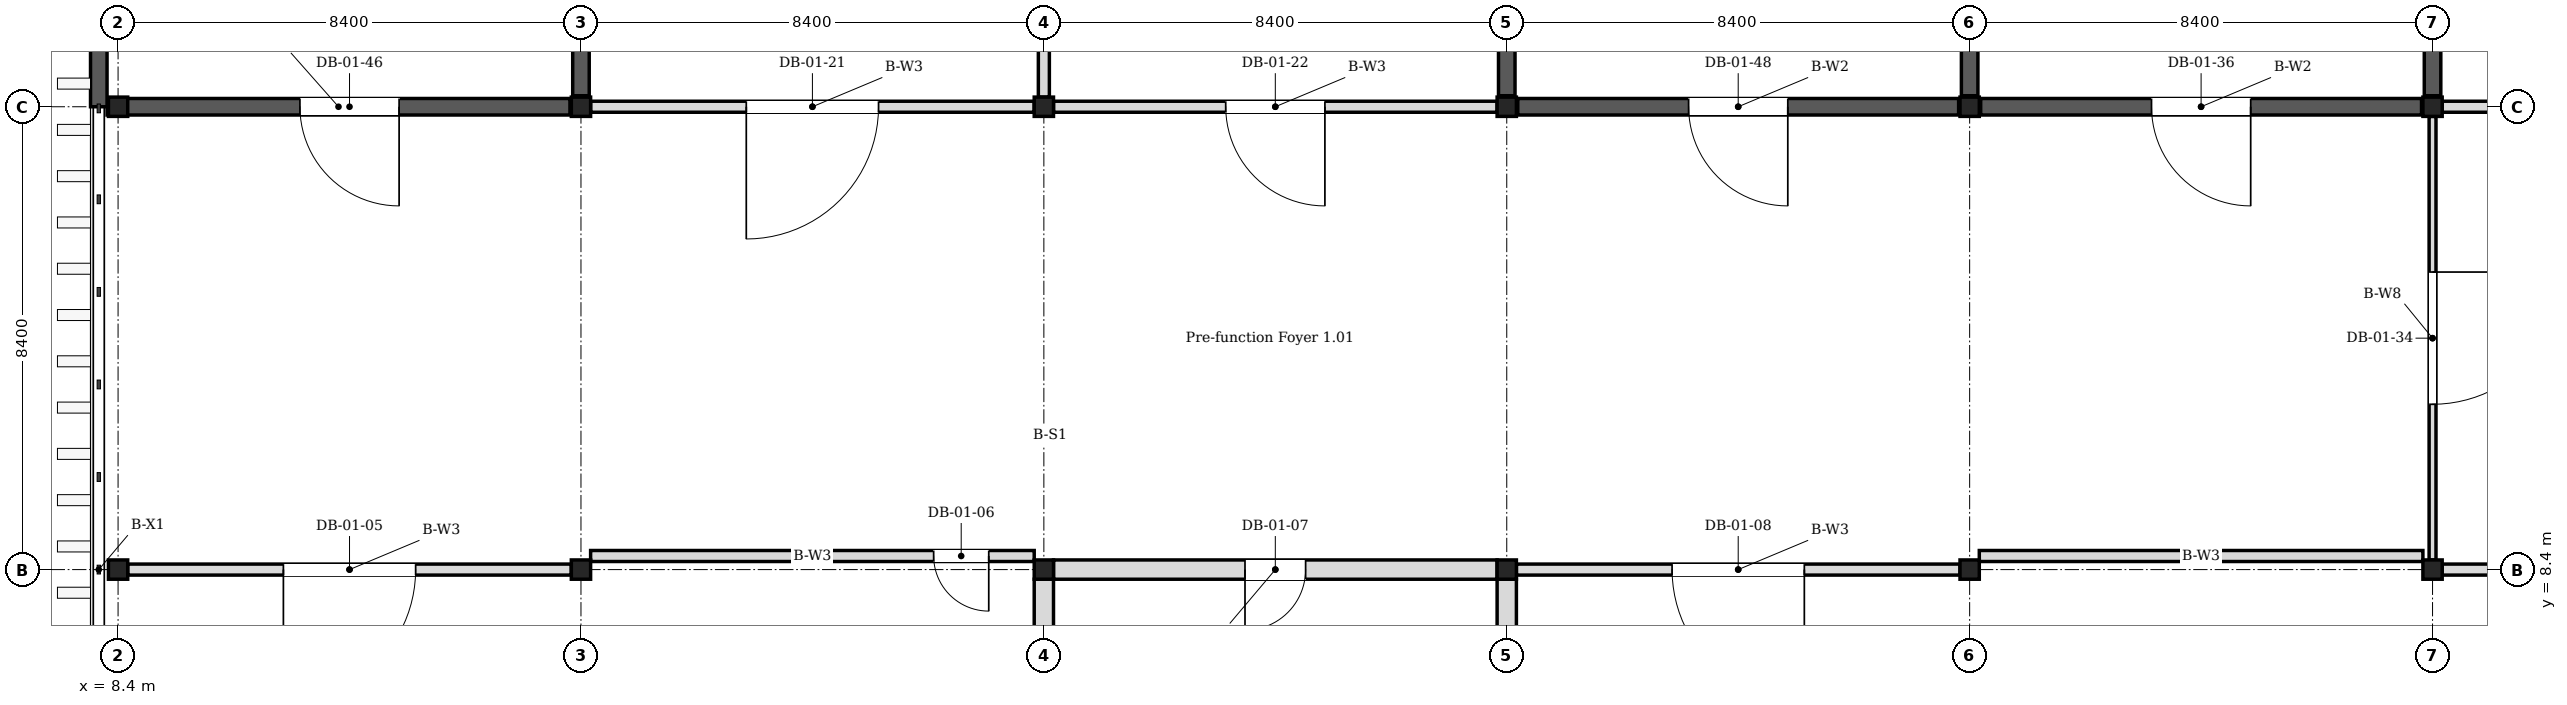
"""IFC4 building model, lengths in metres.
Left out: names, types, materials, properties, quantities, classifications, styles, units other than length and angle.
Written with IfcOpenShell. Run it as: python <this file> out.ifc"""

import sys

from ifc_helpers import new_model, si_unit, direction, frame, frame_2d, origin, origin_2d, place, context, subcontext, project, spatial, rectangle, i_section, extrude, element, fill, save


model = new_model("IFC4")
c1 = context("Model", 3, precision=1e-05, world=origin(), true_north=direction((0.0, 1.0)))
c2 = subcontext(c1, "Body", "Model", "MODEL_VIEW")
j1 = project(units=[si_unit("LENGTHUNIT", "METRE"), si_unit("PLANEANGLEUNIT", "RADIAN")], contexts=[c1])
p1 = place(None, origin())
s1 = spatial("IfcSite", under=j1, at=p1, CompositionType="ELEMENT")
p2 = place(p1, origin())
s2 = spatial("IfcBuilding", under=s1, at=p2, CompositionType="ELEMENT")
p3 = place(p2, frame((0.0, 0.0, 6.0)))
s3 = spatial("IfcBuildingStorey", under=s2, at=p3, CompositionType="ELEMENT", Elevation=6.0)
for number, where, z_axis, x_axis in (
    (1, (8.4, 8.4, 0.0), (0.0, 0.0, 1.0), (1.0, 0.0, 0.0)),
    (2, (8.4, 16.8, 0.0), (0.0, 0.0, 1.0), (1.0, 0.0, 0.0)),
    (3, (16.8, 8.4, 0.0), (0.0, 0.0, 1.0), (1.0, 0.0, 0.0)),
    (4, (16.8, 16.8, 0.0), (0.0, 0.0, 1.0), (1.0, 0.0, 0.0)),
    (5, (25.2, 8.4, 0.0), (0.0, 0.0, 1.0), (1.0, 0.0, 0.0)),
    (6, (25.2, 16.8, 0.0), (0.0, 0.0, 1.0), (1.0, 0.0, 0.0)),
    (7, (33.6, 8.4, 0.0), (0.0, 0.0, 1.0), (1.0, 0.0, 0.0)),
    (8, (33.6, 16.8, 0.0), (0.0, 0.0, 1.0), (1.0, 0.0, 0.0)),
    (9, (42.0, 8.4, 0.0), (0.0, 0.0, 1.0), (1.0, 0.0, 0.0)),
    (10, (42.0, 16.8, 0.0), (0.0, 0.0, 1.0), (1.0, 0.0, 0.0)),
    (11, (50.4, 8.4, 0.0), (0.0, 0.0, 1.0), (1.0, 0.0, 0.0)),
    (12, (50.4, 16.8, 0.0), (0.0, 0.0, 1.0), (1.0, 0.0, 0.0)),
):
    element("IfcColumn", number, at=place(p3, frame(where, z_axis=z_axis, x_axis=x_axis)), inside=s3, PredefinedType="COLUMN", context=c2, shape_type="SweptSolid", body=[
        extrude(i_section(OverallWidth=0.35, OverallDepth=0.35, WebThickness=0.012, FlangeThickness=0.019, FilletRadius=0.013, at=origin_2d()), origin(), (0.0, 0.0, 1.0), 4.2),
    ])
for number, where, z_axis, x_axis in (
    (13, (42.0, 17.0, 0.0), (0.0, 0.0, 1.0), (0.0, 1.0, 0.0)),
    (14, (50.4, 17.0, 0.0), (0.0, 0.0, 1.0), (0.0, 1.0, 0.0)),
):
    element("IfcWall", number, at=place(p3, frame(where, z_axis=z_axis, x_axis=x_axis)), inside=s3, PredefinedType="SHEAR", context=c2, shape_type="SweptSolid", body=[
        extrude(rectangle(XDim=8.0, YDim=0.3, at=frame_2d((4.0, 0.0))), origin(), (0.0, 0.0, 1.0), 4.05),
    ])
p4 = place(p3, frame((42.2, 16.8, 0.0), z_axis=(0.0, 0.0, 1.0), x_axis=(1.0, 0.0, 0.0)))
e15 = element("IfcWall", 15, at=p4, inside=s3, PredefinedType="SHEAR", context=c2, shape_type="SweptSolid", body=[
    extrude(rectangle(XDim=8.0, YDim=0.3, at=frame_2d((4.0, 0.0))), origin(), (0.0, 0.0, 1.0), 4.05),
])
p5 = place(p4, frame((3.1, 0.0, 0.0)))
e16 = element("IfcOpeningElement", 16, at=p5, cuts=e15, PredefinedType="OPENING", context=c2, shape_type="SweptSolid", body=[
    extrude(rectangle(XDim=1.8, YDim=2.1, at=frame_2d((0.9, 1.05))), frame((0.0, 0.16, 0.0), z_axis=(0.0, -1.0, 0.0), x_axis=(1.0, 0.0, 0.0)), (0.0, 0.0, 1.0), 0.32),
])
p6 = place(p3, frame((8.05, 16.8, 0.0), z_axis=(0.0, 0.0, 1.0), x_axis=(0.0, 1.0, 0.0)))
e17 = element("IfcWall", 17, at=p6, inside=s3, PredefinedType="SHEAR", context=c2, shape_type="SweptSolid", body=[
    extrude(rectangle(XDim=8.6, YDim=0.3, at=frame_2d((4.3, 0.0))), origin(), (0.0, 0.0, 1.0), 4.05),
])
p7 = place(p3, frame((16.8, 17.0, 0.0), z_axis=(0.0, 0.0, 1.0), x_axis=(0.0, 1.0, 0.0)))
e18 = element("IfcWall", 18, at=p7, inside=s3, PredefinedType="SHEAR", context=c2, shape_type="SweptSolid", body=[
    extrude(rectangle(XDim=8.0, YDim=0.3, at=frame_2d((4.0, 0.0))), origin(), (0.0, 0.0, 1.0), 4.05),
])
p8 = place(p3, frame((8.2, 16.8, 0.0), z_axis=(0.0, 0.0, 1.0), x_axis=(1.0, 0.0, 0.0)))
e19 = element("IfcWall", 19, at=p8, inside=s3, PredefinedType="SHEAR", context=c2, shape_type="SweptSolid", body=[
    extrude(rectangle(XDim=8.4, YDim=0.3, at=frame_2d((4.2, 0.0))), origin(), (0.0, 0.0, 1.0), 4.05),
])
p9 = place(p8, frame((3.5, 0.0, 0.0)))
e20 = element("IfcOpeningElement", 20, at=p9, cuts=e19, PredefinedType="OPENING", context=c2, shape_type="SweptSolid", body=[
    extrude(rectangle(XDim=1.8, YDim=2.1, at=frame_2d((0.9, 1.05))), frame((0.0, 0.16, 0.0), z_axis=(0.0, -1.0, 0.0), x_axis=(1.0, 0.0, 0.0)), (0.0, 0.0, 1.0), 0.32),
])
p10 = place(p3, frame((33.6, 17.0, 0.0), z_axis=(0.0, 0.0, 1.0), x_axis=(0.0, 1.0, 0.0)))
e21 = element("IfcWall", 21, at=p10, inside=s3, PredefinedType="SHEAR", context=c2, shape_type="SweptSolid", body=[
    extrude(rectangle(XDim=8.0, YDim=0.3, at=frame_2d((4.0, 0.0))), origin(), (0.0, 0.0, 1.0), 4.05),
])
p11 = place(p3, frame((33.8, 16.8, 0.0), z_axis=(0.0, 0.0, 1.0), x_axis=(1.0, 0.0, 0.0)))
e22 = element("IfcWall", 22, at=p11, inside=s3, PredefinedType="SHEAR", context=c2, shape_type="SweptSolid", body=[
    extrude(rectangle(XDim=8.0, YDim=0.3, at=frame_2d((4.0, 0.0))), origin(), (0.0, 0.0, 1.0), 4.05),
])
p12 = place(p11, frame((3.1, 0.0, 0.0)))
e23 = element("IfcOpeningElement", 23, at=p12, cuts=e22, PredefinedType="OPENING", context=c2, shape_type="SweptSolid", body=[
    extrude(rectangle(XDim=1.8, YDim=2.1, at=frame_2d((0.9, 1.05))), frame((0.0, 0.16, 0.0), z_axis=(0.0, -1.0, 0.0), x_axis=(1.0, 0.0, 0.0)), (0.0, 0.0, 1.0), 0.32),
])
p13 = place(p3, frame((8.575, 8.4, 0.0), z_axis=(0.0, 0.0, 1.0), x_axis=(1.0, 0.0, 0.0)))
e24 = element("IfcWall", 24, at=p13, inside=s3, PredefinedType="PARTITIONING", context=c2, shape_type="SweptSolid", body=[
    extrude(rectangle(XDim=8.05, YDim=0.2, at=frame_2d((4.025, 0.0))), origin(), (0.0, 0.0, 1.0), 3.35),
])
p14 = place(p13, frame((2.825, 0.0, 0.0)))
e25 = element("IfcOpeningElement", 25, at=p14, cuts=e24, PredefinedType="OPENING", context=c2, shape_type="SweptSolid", body=[
    extrude(rectangle(XDim=2.4, YDim=2.2, at=frame_2d((1.2, 1.1))), frame((0.0, 0.11, 0.0), z_axis=(0.0, -1.0, 0.0), x_axis=(1.0, 0.0, 0.0)), (0.0, 0.0, 1.0), 0.22),
])
p15 = place(p3, frame((16.975, 8.646, 0.0), z_axis=(0.0, 0.0, 1.0), x_axis=(1.0, 0.0, 0.0)))
e26 = element("IfcWall", 26, at=p15, inside=s3, PredefinedType="PARTITIONING", context=c2, shape_type="SweptSolid", body=[
    extrude(rectangle(XDim=8.05, YDim=0.2, at=frame_2d((4.025, 0.0))), origin(), (0.0, 0.0, 1.0), 3.35),
])
p16 = place(p15, frame((6.225, 0.0, 0.0)))
e27 = element("IfcOpeningElement", 27, at=p16, cuts=e26, PredefinedType="OPENING", context=c2, shape_type="SweptSolid", body=[
    extrude(rectangle(XDim=1.0, YDim=2.1, at=frame_2d((0.5, 1.05))), frame((0.0, 0.11, 0.0), z_axis=(0.0, -1.0, 0.0), x_axis=(1.0, 0.0, 0.0)), (0.0, 0.0, 1.0), 0.22),
])
p17 = place(p3, frame((25.375, 8.4, 0.0), z_axis=(0.0, 0.0, 1.0), x_axis=(1.0, 0.0, 0.0)))
e28 = element("IfcWall", 28, at=p17, inside=s3, PredefinedType="PARTITIONING", context=c2, shape_type="SweptSolid", body=[
    extrude(rectangle(XDim=8.05, YDim=0.35, at=frame_2d((4.025, 0.0))), origin(), (0.0, 0.0, 1.0), 3.35),
])
p18 = place(p17, frame((3.475, 0.0, 0.0)))
e29 = element("IfcOpeningElement", 29, at=p18, cuts=e28, PredefinedType="OPENING", context=c2, shape_type="SweptSolid", body=[
    extrude(rectangle(XDim=1.1, YDim=2.4, at=frame_2d((0.55, 1.2))), frame((0.0, 0.185, 0.0), z_axis=(0.0, -1.0, 0.0), x_axis=(1.0, 0.0, 0.0)), (0.0, 0.0, 1.0), 0.37),
])
p19 = place(p3, frame((33.775, 8.4, 0.0), z_axis=(0.0, 0.0, 1.0), x_axis=(1.0, 0.0, 0.0)))
e30 = element("IfcWall", 30, at=p19, inside=s3, PredefinedType="PARTITIONING", context=c2, shape_type="SweptSolid", body=[
    extrude(rectangle(XDim=8.05, YDim=0.2, at=frame_2d((4.025, 0.0))), origin(), (0.0, 0.0, 1.0), 3.35),
])
p20 = place(p19, frame((2.825, 0.0, 0.0)))
e31 = element("IfcOpeningElement", 31, at=p20, cuts=e30, PredefinedType="OPENING", context=c2, shape_type="SweptSolid", body=[
    extrude(rectangle(XDim=2.4, YDim=2.2, at=frame_2d((1.2, 1.1))), frame((0.0, 0.11, 0.0), z_axis=(0.0, -1.0, 0.0), x_axis=(1.0, 0.0, 0.0)), (0.0, 0.0, 1.0), 0.22),
])
p21 = place(p3, frame((42.175, 8.646, 0.0), z_axis=(0.0, 0.0, 1.0), x_axis=(1.0, 0.0, 0.0)))
e32 = element("IfcWall", 32, at=p21, inside=s3, PredefinedType="PARTITIONING", context=c2, shape_type="SweptSolid", body=[
    extrude(rectangle(XDim=8.05, YDim=0.2, at=frame_2d((4.025, 0.0))), origin(), (0.0, 0.0, 1.0), 3.35),
])
p22 = place(p3, frame((50.575, 8.4, 0.0), z_axis=(0.0, 0.0, 1.0), x_axis=(1.0, 0.0, 0.0)))
e33 = element("IfcWall", 33, at=p22, inside=s3, PredefinedType="PARTITIONING", context=c2, shape_type="SweptSolid", body=[
    extrude(rectangle(XDim=8.05, YDim=0.2, at=frame_2d((4.025, 0.0))), origin(), (0.0, 0.0, 1.0), 3.35),
])
p23 = place(p22, frame((2.825, 0.0, 0.0)))
e34 = element("IfcOpeningElement", 34, at=p23, cuts=e33, PredefinedType="OPENING", context=c2, shape_type="SweptSolid", body=[
    extrude(rectangle(XDim=2.4, YDim=2.2, at=frame_2d((1.2, 1.1))), frame((0.0, 0.11, 0.0), z_axis=(0.0, -1.0, 0.0), x_axis=(1.0, 0.0, 0.0)), (0.0, 0.0, 1.0), 0.22),
])
p24 = place(p3, frame((16.975, 16.8, 0.0), z_axis=(0.0, 0.0, 1.0), x_axis=(1.0, 0.0, 0.0)))
e35 = element("IfcWall", 35, at=p24, inside=s3, PredefinedType="PARTITIONING", context=c2, shape_type="SweptSolid", body=[
    extrude(rectangle(XDim=8.05, YDim=0.2, at=frame_2d((4.025, 0.0))), origin(), (0.0, 0.0, 1.0), 3.35),
])
p25 = place(p24, frame((2.825, 0.0, 0.0)))
e36 = element("IfcOpeningElement", 36, at=p25, cuts=e35, PredefinedType="OPENING", context=c2, shape_type="SweptSolid", body=[
    extrude(rectangle(XDim=2.4, YDim=2.2, at=frame_2d((1.2, 1.1))), frame((0.0, 0.11, 0.0), z_axis=(0.0, -1.0, 0.0), x_axis=(1.0, 0.0, 0.0)), (0.0, 0.0, 1.0), 0.22),
])
p26 = place(p3, frame((25.375, 16.8, 0.0), z_axis=(0.0, 0.0, 1.0), x_axis=(1.0, 0.0, 0.0)))
e37 = element("IfcWall", 37, at=p26, inside=s3, PredefinedType="PARTITIONING", context=c2, shape_type="SweptSolid", body=[
    extrude(rectangle(XDim=8.05, YDim=0.2, at=frame_2d((4.025, 0.0))), origin(), (0.0, 0.0, 1.0), 3.35),
])
p27 = place(p26, frame((3.125, 0.0, 0.0)))
e38 = element("IfcOpeningElement", 38, at=p27, cuts=e37, PredefinedType="OPENING", context=c2, shape_type="SweptSolid", body=[
    extrude(rectangle(XDim=1.8, YDim=2.1, at=frame_2d((0.9, 1.05))), frame((0.0, 0.11, 0.0), z_axis=(0.0, -1.0, 0.0), x_axis=(1.0, 0.0, 0.0)), (0.0, 0.0, 1.0), 0.22),
])
p28 = place(p3, frame((50.575, 16.8, 0.0), z_axis=(0.0, 0.0, 1.0), x_axis=(1.0, 0.0, 0.0)))
e39 = element("IfcWall", 39, at=p28, inside=s3, PredefinedType="PARTITIONING", context=c2, shape_type="SweptSolid", body=[
    extrude(rectangle(XDim=8.05, YDim=0.2, at=frame_2d((4.025, 0.0))), origin(), (0.0, 0.0, 1.0), 3.35),
])
p29 = place(p28, frame((3.125, 0.0, 0.0)))
e40 = element("IfcOpeningElement", 40, at=p29, cuts=e39, PredefinedType="OPENING", context=c2, shape_type="SweptSolid", body=[
    extrude(rectangle(XDim=1.8, YDim=2.1, at=frame_2d((0.9, 1.05))), frame((0.0, 0.11, 0.0), z_axis=(0.0, -1.0, 0.0), x_axis=(1.0, 0.0, 0.0)), (0.0, 0.0, 1.0), 0.22),
])
p30 = place(p3, frame((25.2, 0.175, 0.0), z_axis=(0.0, 0.0, 1.0), x_axis=(0.0, 1.0, 0.0)))
e41 = element("IfcWall", 41, at=p30, inside=s3, PredefinedType="PARTITIONING", context=c2, shape_type="SweptSolid", body=[
    extrude(rectangle(XDim=8.05, YDim=0.35, at=frame_2d((4.025, 0.0))), origin(), (0.0, 0.0, 1.0), 3.35),
])
p31 = place(p3, frame((25.2, 16.975, 0.0), z_axis=(0.0, 0.0, 1.0), x_axis=(0.0, 1.0, 0.0)))
e42 = element("IfcWall", 42, at=p31, inside=s3, PredefinedType="PARTITIONING", context=c2, shape_type="SweptSolid", body=[
    extrude(rectangle(XDim=8.05, YDim=0.2, at=frame_2d((4.025, 0.0))), origin(), (0.0, 0.0, 1.0), 3.35),
])
p32 = place(p3, frame((33.6, 0.175, 0.0), z_axis=(0.0, 0.0, 1.0), x_axis=(0.0, 1.0, 0.0)))
e43 = element("IfcWall", 43, at=p32, inside=s3, PredefinedType="PARTITIONING", context=c2, shape_type="SweptSolid", body=[
    extrude(rectangle(XDim=8.05, YDim=0.35, at=frame_2d((4.025, 0.0))), origin(), (0.0, 0.0, 1.0), 3.35),
])
p33 = place(p3, frame((50.4, 8.575, 0.0), z_axis=(0.0, 0.0, 1.0), x_axis=(0.0, 1.0, 0.0)))
e44 = element("IfcWall", 44, at=p33, inside=s3, PredefinedType="PARTITIONING", context=c2, shape_type="SweptSolid", body=[
    extrude(rectangle(XDim=8.05, YDim=0.125, at=frame_2d((4.025, 0.0))), origin(), (0.0, 0.0, 1.0), 3.35),
])
p34 = place(p33, frame((2.825, 0.0, 0.0)))
e45 = element("IfcOpeningElement", 45, at=p34, cuts=e44, PredefinedType="OPENING", context=c2, shape_type="SweptSolid", body=[
    extrude(rectangle(XDim=2.4, YDim=2.2, at=frame_2d((1.2, 1.1))), frame((0.0, 0.073, 0.0), z_axis=(0.0, -1.0, 0.0), x_axis=(1.0, 0.0, 0.0)), (0.0, 0.0, 1.0), 0.145),
])
p35 = place(p14, origin())
e46 = element("IfcDoor", 46, at=p35, inside=s3, OperationType="DOUBLE_DOOR_SINGLE_SWING", PredefinedType="DOOR", context=c2, shape_type="SweptSolid", body=[
    extrude(rectangle(XDim=2.4, YDim=2.2, at=frame_2d((1.2, 1.1))), frame((0.0, 0.025, 0.0), z_axis=(0.0, -1.0, 0.0), x_axis=(1.0, 0.0, 0.0)), (0.0, 0.0, 1.0), 0.05),
])
fill(e25, e46)
p36 = place(p16, origin())
e47 = element("IfcDoor", 47, at=p36, inside=s3, OperationType="SINGLE_SWING_LEFT", PredefinedType="DOOR", context=c2, shape_type="SweptSolid", body=[
    extrude(rectangle(XDim=1.0, YDim=2.1, at=frame_2d((0.5, 1.05))), frame((0.0, 0.025, 0.0), z_axis=(0.0, -1.0, 0.0), x_axis=(1.0, 0.0, 0.0)), (0.0, 0.0, 1.0), 0.05),
])
fill(e27, e47)
p37 = place(p18, origin())
e48 = element("IfcDoor", 48, at=p37, inside=s3, OperationType="SINGLE_SWING_LEFT", PredefinedType="DOOR", context=c2, shape_type="SweptSolid", body=[
    extrude(rectangle(XDim=1.1, YDim=2.4, at=frame_2d((0.55, 1.2))), frame((0.0, 0.025, 0.0), z_axis=(0.0, -1.0, 0.0), x_axis=(1.0, 0.0, 0.0)), (0.0, 0.0, 1.0), 0.05),
])
fill(e29, e48)
p38 = place(p20, origin())
e49 = element("IfcDoor", 49, at=p38, inside=s3, OperationType="DOUBLE_DOOR_SINGLE_SWING", PredefinedType="DOOR", context=c2, shape_type="SweptSolid", body=[
    extrude(rectangle(XDim=2.4, YDim=2.2, at=frame_2d((1.2, 1.1))), frame((0.0, 0.025, 0.0), z_axis=(0.0, -1.0, 0.0), x_axis=(1.0, 0.0, 0.0)), (0.0, 0.0, 1.0), 0.05),
])
fill(e31, e49)
p39 = place(p25, origin())
e50 = element("IfcDoor", 50, at=p39, inside=s3, OperationType="DOUBLE_DOOR_SINGLE_SWING", PredefinedType="DOOR", context=c2, shape_type="SweptSolid", body=[
    extrude(rectangle(XDim=2.4, YDim=2.2, at=frame_2d((1.2, 1.1))), frame((0.0, 0.025, 0.0), z_axis=(0.0, -1.0, 0.0), x_axis=(1.0, 0.0, 0.0)), (0.0, 0.0, 1.0), 0.05),
])
fill(e36, e50)
p40 = place(p27, origin())
e51 = element("IfcDoor", 51, at=p40, inside=s3, OperationType="DOUBLE_DOOR_SINGLE_SWING", PredefinedType="DOOR", context=c2, shape_type="SweptSolid", body=[
    extrude(rectangle(XDim=1.8, YDim=2.1, at=frame_2d((0.9, 1.05))), frame((0.0, 0.025, 0.0), z_axis=(0.0, -1.0, 0.0), x_axis=(1.0, 0.0, 0.0)), (0.0, 0.0, 1.0), 0.05),
])
fill(e38, e51)
p41 = place(p34, origin())
e52 = element("IfcDoor", 52, at=p41, inside=s3, OperationType="DOUBLE_DOOR_SINGLE_SWING", PredefinedType="DOOR", context=c2, shape_type="SweptSolid", body=[
    extrude(rectangle(XDim=2.4, YDim=2.2, at=frame_2d((1.2, 1.1))), frame((0.0, 0.025, 0.0), z_axis=(0.0, -1.0, 0.0), x_axis=(1.0, 0.0, 0.0)), (0.0, 0.0, 1.0), 0.05),
])
fill(e45, e52)
p42 = place(p5, origin())
e53 = element("IfcDoor", 53, at=p42, inside=s3, OperationType="DOUBLE_DOOR_SINGLE_SWING", PredefinedType="DOOR", context=c2, shape_type="SweptSolid", body=[
    extrude(rectangle(XDim=1.8, YDim=2.1, at=frame_2d((0.9, 1.05))), frame((0.0, 0.025, 0.0), z_axis=(0.0, -1.0, 0.0), x_axis=(1.0, 0.0, 0.0)), (0.0, 0.0, 1.0), 0.05),
])
fill(e16, e53)
p43 = place(p9, origin())
e54 = element("IfcDoor", 54, at=p43, inside=s3, OperationType="DOUBLE_DOOR_SINGLE_SWING", PredefinedType="DOOR", context=c2, shape_type="SweptSolid", body=[
    extrude(rectangle(XDim=1.8, YDim=2.1, at=frame_2d((0.9, 1.05))), frame((0.0, 0.025, 0.0), z_axis=(0.0, -1.0, 0.0), x_axis=(1.0, 0.0, 0.0)), (0.0, 0.0, 1.0), 0.05),
])
fill(e20, e54)
p44 = place(p12, origin())
e55 = element("IfcDoor", 55, at=p44, inside=s3, OperationType="DOUBLE_DOOR_SINGLE_SWING", PredefinedType="DOOR", context=c2, shape_type="SweptSolid", body=[
    extrude(rectangle(XDim=1.8, YDim=2.1, at=frame_2d((0.9, 1.05))), frame((0.0, 0.025, 0.0), z_axis=(0.0, -1.0, 0.0), x_axis=(1.0, 0.0, 0.0)), (0.0, 0.0, 1.0), 0.05),
])
fill(e23, e55)
save(model, sys.argv[1])
